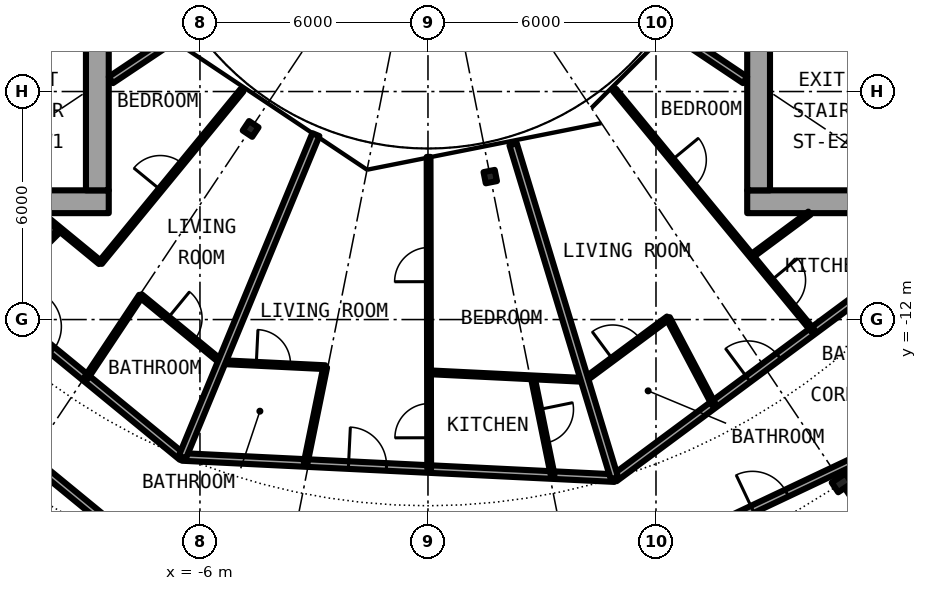
"""IFC4 building model, lengths in metres.
Left out: names, types, materials, properties, quantities, classifications, styles, units other than length and angle.
Written with IfcOpenShell. Run it as: python <this file> out.ifc"""

import sys

from ifc_helpers import new_model, si_unit, direction, frame, frame_2d, origin, origin_2d, place, context, subcontext, project, spatial, rectangle, i_section, extrude, element, fill, save


model = new_model("IFC4")
c1 = context("Model", 3, precision=1e-05, world=origin(), true_north=direction((0.0, 1.0)))
c2 = subcontext(c1, "Body", "Model", "MODEL_VIEW")
j1 = project(units=[si_unit("LENGTHUNIT", "METRE"), si_unit("PLANEANGLEUNIT", "RADIAN")], contexts=[c1])
p1 = place(None, origin())
s1 = spatial("IfcSite", under=j1, at=p1, CompositionType="ELEMENT")
p2 = place(p1, origin())
s2 = spatial("IfcBuilding", under=s1, at=p2, CompositionType="ELEMENT")
p3 = place(p2, frame((0.0, 0.0, 111.65)))
s3 = spatial("IfcBuildingStorey", under=s2, at=p3, CompositionType="ELEMENT", Elevation=111.65)
p4 = place(p3, frame((10.889, -16.297, 0.0), z_axis=(0.0, 0.0, 1.0), x_axis=(0.55557023302, -0.831469612303, 0.0)))
e1 = element("IfcColumn", 1, at=p4, inside=s3, PredefinedType="COLUMN", context=c2, shape_type="SweptSolid", body=[
    extrude(i_section(OverallWidth=0.307, OverallDepth=0.432, WebThickness=0.021, FlangeThickness=0.04, FilletRadius=0.027, at=origin_2d()), origin(), (0.0, 0.0, 1.0), 3.05),
])
for number, where, z_axis, x_axis in (
    (2, (-4.667, -6.984, 0.0), (0.0, 0.0, 1.0), (-0.556, -0.831, 0.0)),
    (3, (1.639, -8.239, 0.0), (0.0, 0.0, 1.0), (0.195, -0.981, 0.0)),
):
    element("IfcColumn", number, at=place(p3, frame(where, z_axis=z_axis, x_axis=x_axis)), inside=s3, PredefinedType="COLUMN", context=c2, shape_type="SweptSolid", body=[
        extrude(i_section(OverallWidth=0.3, OverallDepth=0.3, WebThickness=0.011, FlangeThickness=0.019, FilletRadius=0.027, at=origin_2d()), origin(), (0.0, 0.0, 1.0), 3.05),
    ])
p5 = place(p3, frame((8.4, -8.9, 0.0), z_axis=(0.0, 0.0, 1.0), x_axis=(1.0, 0.0, 0.0)))
e4 = element("IfcWall", 4, at=p5, inside=s3, PredefinedType="SHEAR", context=c2, shape_type="SweptSolid", body=[
    extrude(rectangle(XDim=13.8, YDim=0.6, at=frame_2d((6.9, 0.0))), origin(), (0.0, 0.0, 1.0), 3.05),
])
p6 = place(p5, frame((11.475, 0.0, 0.0)))
e5 = element("IfcOpeningElement", 5, at=p6, cuts=e4, PredefinedType="OPENING", context=c2, shape_type="SweptSolid", body=[
    extrude(rectangle(XDim=1.2, YDim=2.3, at=frame_2d((0.6, 1.15))), frame((0.0, 0.31, 0.0), z_axis=(0.0, -1.0, 0.0), x_axis=(1.0, 0.0, 0.0)), (0.0, 0.0, 1.0), 0.62),
])
p7 = place(p3, frame((8.7, -8.6, 0.0), z_axis=(0.0, 0.0, 1.0), x_axis=(0.0, 1.0, 0.0)))
e6 = element("IfcWall", 6, at=p7, inside=s3, PredefinedType="SHEAR", context=c2, shape_type="SweptSolid", body=[
    extrude(rectangle(XDim=17.2, YDim=0.6, at=frame_2d((8.6, 0.0))), origin(), (0.0, 0.0, 1.0), 3.05),
])
p8 = place(p7, frame((7.4, 0.0, 0.1)))
e7 = element("IfcOpeningElement", 7, at=p8, cuts=e6, PredefinedType="OPENING", context=c2, shape_type="SweptSolid", body=[
    extrude(rectangle(XDim=2.4, YDim=2.2, at=frame_2d((1.2, 1.1))), frame((0.0, 0.31, 0.0), z_axis=(0.0, -1.0, 0.0), x_axis=(1.0, 0.0, 0.0)), (0.0, 0.0, 1.0), 0.62),
])
p9 = place(p3, frame((-22.2, -8.9, 0.0), z_axis=(0.0, 0.0, 1.0), x_axis=(1.0, 0.0, 0.0)))
e8 = element("IfcWall", 8, at=p9, inside=s3, PredefinedType="SHEAR", context=c2, shape_type="SweptSolid", body=[
    extrude(rectangle(XDim=13.8, YDim=0.6, at=frame_2d((6.9, 0.0))), origin(), (0.0, 0.0, 1.0), 3.05),
])
p10 = place(p9, frame((1.125, 0.0, 0.0)))
e9 = element("IfcOpeningElement", 9, at=p10, cuts=e8, PredefinedType="OPENING", context=c2, shape_type="SweptSolid", body=[
    extrude(rectangle(XDim=1.2, YDim=2.3, at=frame_2d((0.6, 1.15))), frame((0.0, 0.31, 0.0), z_axis=(0.0, -1.0, 0.0), x_axis=(1.0, 0.0, 0.0)), (0.0, 0.0, 1.0), 0.62),
])
p11 = place(p3, frame((-8.7, 8.6, 0.0), z_axis=(0.0, 0.0, 1.0), x_axis=(0.0, -1.0, 0.0)))
e10 = element("IfcWall", 10, at=p11, inside=s3, PredefinedType="SHEAR", context=c2, shape_type="SweptSolid", body=[
    extrude(rectangle(XDim=17.2, YDim=0.6, at=frame_2d((8.6, 0.0))), origin(), (0.0, 0.0, 1.0), 3.05),
])
p12 = place(p11, frame((7.4, 0.0, 0.1)))
e11 = element("IfcOpeningElement", 11, at=p12, cuts=e10, PredefinedType="OPENING", context=c2, shape_type="SweptSolid", body=[
    extrude(rectangle(XDim=2.4, YDim=2.2, at=frame_2d((1.2, 1.1))), frame((0.0, 0.31, 0.0), z_axis=(0.0, -1.0, 0.0), x_axis=(1.0, 0.0, 0.0)), (0.0, 0.0, 1.0), 0.62),
])
p13 = place(p3, frame((-13.538, -16.496, 0.0), z_axis=(0.0, 0.0, 1.0), x_axis=(0.773000340237, -0.634405606843, 0.0)))
e12 = element("IfcWall", 12, at=p13, inside=s3, PredefinedType="PARTITIONING", context=c2, shape_type="SweptSolid", body=[
    extrude(rectangle(XDim=6.474, YDim=0.1, at=frame_2d((3.237, 0.0))), origin(), (0.0, 0.0, 1.0), 2.7),
])
p14 = place(p3, frame((3.967, -19.155, 0.0), z_axis=(0.0, 0.0, 1.0), x_axis=(0.904003983145, 0.427524032609, 0.0)))
e13 = element("IfcWall", 13, at=p14, inside=s3, PredefinedType="PARTITIONING", context=c2, shape_type="SweptSolid", body=[
    extrude(rectangle(XDim=9.37, YDim=0.2, at=frame_2d((4.685, 0.0))), origin(), (0.0, 0.0, 1.0), 2.39),
])
p15 = place(p14, frame((5.056, 0.0, 0.0)))
e14 = element("IfcOpeningElement", 14, at=p15, cuts=e13, PredefinedType="OPENING", context=c2, shape_type="SweptSolid", body=[
    extrude(rectangle(XDim=1.0, YDim=2.3, at=frame_2d((0.5, 1.15))), frame((0.0, 0.11, 0.0), z_axis=(0.0, -1.0, 0.0), x_axis=(1.0, 0.0, 0.0)), (0.0, 0.0, 1.0), 0.22),
])
p16 = place(p3, frame((-16.173, -10.991, 0.0), z_axis=(0.0, 0.0, 1.0), x_axis=(0.773013989296, -0.634388975591, 0.0)))
e15 = element("IfcWall", 15, at=p16, inside=s3, PredefinedType="PARTITIONING", context=c2, shape_type="SweptSolid", body=[
    extrude(rectangle(XDim=11.219, YDim=0.2, at=frame_2d((5.609, 0.0))), origin(), (0.0, 0.0, 1.0), 2.39),
])
p17 = place(p16, frame((3.135, 0.0, 0.0)))
e16 = element("IfcOpeningElement", 16, at=p17, cuts=e15, PredefinedType="OPENING", context=c2, shape_type="SweptSolid", body=[
    extrude(rectangle(XDim=1.0, YDim=2.3, at=frame_2d((0.5, 1.15))), frame((0.0, 0.11, 0.0), z_axis=(0.0, -1.0, 0.0), x_axis=(1.0, 0.0, 0.0)), (0.0, 0.0, 1.0), 0.22),
])
p18 = place(p3, frame((-14.05, -9.392, 0.0), z_axis=(0.0, 0.0, 1.0), x_axis=(0.773074935257, -0.634314704605, 0.0)))
e17 = element("IfcWall", 17, at=p18, inside=s3, PredefinedType="PARTITIONING", context=c2, shape_type="SweptSolid", body=[
    extrude(rectangle(XDim=9.809, YDim=0.2, at=frame_2d((4.904, 0.0))), origin(), (0.0, 0.0, 1.0), 2.7),
])
p19 = place(p18, frame((4.402, 0.0, 0.0)))
e18 = element("IfcOpeningElement", 18, at=p19, cuts=e17, PredefinedType="OPENING", context=c2, shape_type="SweptSolid", body=[
    extrude(rectangle(XDim=1.0, YDim=2.3, at=frame_2d((0.5, 1.15))), frame((0.0, 0.11, 0.0), z_axis=(0.0, -1.0, 0.0), x_axis=(1.0, 0.0, 0.0)), (0.0, 0.0, 1.0), 0.22),
])
p20 = place(p3, frame((-6.467, -15.615, 0.0), z_axis=(0.0, 0.0, 1.0), x_axis=(0.998803328932, -0.048907158111, 0.0)))
e19 = element("IfcWall", 19, at=p20, inside=s3, PredefinedType="PARTITIONING", context=c2, shape_type="SweptSolid", body=[
    extrude(rectangle(XDim=11.392, YDim=0.2, at=frame_2d((5.696, 0.0))), origin(), (0.0, 0.0, 1.0), 2.7),
])
p21 = place(p20, frame((4.381, 0.0, 0.0)))
e20 = element("IfcOpeningElement", 20, at=p21, cuts=e19, PredefinedType="OPENING", context=c2, shape_type="SweptSolid", body=[
    extrude(rectangle(XDim=1.0, YDim=2.3, at=frame_2d((0.5, 1.15))), frame((0.0, 0.11, 0.0), z_axis=(0.0, -1.0, 0.0), x_axis=(1.0, 0.0, 0.0)), (0.0, 0.0, 1.0), 0.22),
])
p22 = place(p3, frame((4.906, -16.172, 0.0), z_axis=(0.0, 0.0, 1.0), x_axis=(0.803191461888, 0.595720971219, 0.0)))
e21 = element("IfcWall", 21, at=p22, inside=s3, PredefinedType="PARTITIONING", context=c2, shape_type="SweptSolid", body=[
    extrude(rectangle(XDim=9.76, YDim=0.2, at=frame_2d((4.88, 0.0))), origin(), (0.0, 0.0, 1.0), 2.7),
])
p23 = place(p22, frame((4.38, 0.0, 0.0)))
e22 = element("IfcOpeningElement", 22, at=p23, cuts=e21, PredefinedType="OPENING", context=c2, shape_type="SweptSolid", body=[
    extrude(rectangle(XDim=1.0, YDim=2.3, at=frame_2d((0.5, 1.15))), frame((0.0, 0.11, 0.0), z_axis=(0.0, -1.0, 0.0), x_axis=(1.0, 0.0, 0.0)), (0.0, 0.0, 1.0), 0.22),
])
p24 = place(p3, frame((-10.213, -9.197, 0.0), z_axis=(0.0, 0.0, 1.0), x_axis=(0.772817828959, -0.634627925042, 0.0)))
e23 = element("IfcWall", 23, at=p24, inside=s3, PredefinedType="PARTITIONING", context=c2, shape_type="SweptSolid", body=[
    extrude(rectangle(XDim=2.055, YDim=0.1, at=frame_2d((1.027, 0.0))), origin(), (0.0, 0.0, 1.0), 2.7),
])
p25 = place(p3, frame((-7.563, -11.373, 0.0), z_axis=(0.0, 0.0, 1.0), x_axis=(0.772732480827, -0.634731843439, 0.0)))
e24 = element("IfcWall", 24, at=p25, inside=s3, PredefinedType="PARTITIONING", context=c2, shape_type="SweptSolid", body=[
    extrude(rectangle(XDim=2.748, YDim=0.1, at=frame_2d((1.374, 0.0))), origin(), (0.0, 0.0, 1.0), 2.7),
])
p26 = place(p25, frame((0.93, 0.0, 0.0)))
e25 = element("IfcOpeningElement", 25, at=p26, cuts=e24, PredefinedType="OPENING", context=c2, shape_type="SweptSolid", body=[
    extrude(rectangle(XDim=0.9, YDim=2.3, at=frame_2d((0.45, 1.15))), frame((0.0, 0.06, 0.0), z_axis=(0.0, -1.0, 0.0), x_axis=(1.0, 0.0, 0.0)), (0.0, 0.0, 1.0), 0.12),
])
p27 = place(p3, frame((-5.434, -13.119, 0.0), z_axis=(0.0, 0.0, 1.0), x_axis=(0.998796928508, -0.049037695739, 0.0)))
e26 = element("IfcWall", 26, at=p27, inside=s3, PredefinedType="PARTITIONING", context=c2, shape_type="SweptSolid", body=[
    extrude(rectangle(XDim=2.733, YDim=0.1, at=frame_2d((1.367, 0.0))), origin(), (0.0, 0.0, 1.0), 2.7),
])
p28 = place(p27, frame((0.917, 0.0, 0.0)))
e27 = element("IfcOpeningElement", 27, at=p28, cuts=e26, PredefinedType="OPENING", context=c2, shape_type="SweptSolid", body=[
    extrude(rectangle(XDim=0.9, YDim=2.3, at=frame_2d((0.45, 1.15))), frame((0.0, 0.06, 0.0), z_axis=(0.0, -1.0, 0.0), x_axis=(1.0, 0.0, 0.0)), (0.0, 0.0, 1.0), 0.12),
])
p29 = place(p3, frame((0.027, -13.387, 0.0), z_axis=(0.0, 0.0, 1.0), x_axis=(0.998789681748, -0.049185075323, 0.0)))
e28 = element("IfcWall", 28, at=p29, inside=s3, PredefinedType="PARTITIONING", context=c2, shape_type="SweptSolid", body=[
    extrude(rectangle(XDim=4.11, YDim=0.1, at=frame_2d((2.055, 0.0))), origin(), (0.0, 0.0, 1.0), 2.7),
])
p30 = place(p3, frame((4.122, -13.589, 0.0), z_axis=(0.0, 0.0, 1.0), x_axis=(0.803128348509, 0.595806055542, 0.0)))
e29 = element("IfcWall", 29, at=p30, inside=s3, PredefinedType="PARTITIONING", context=c2, shape_type="SweptSolid", body=[
    extrude(rectangle(XDim=2.734, YDim=0.1, at=frame_2d((1.367, 0.0))), origin(), (0.0, 0.0, 1.0), 2.7),
])
p31 = place(p30, frame((0.917, 0.0, 0.0)))
e30 = element("IfcOpeningElement", 30, at=p31, cuts=e29, PredefinedType="OPENING", context=c2, shape_type="SweptSolid", body=[
    extrude(rectangle(XDim=0.9, YDim=2.3, at=frame_2d((0.45, 1.15))), frame((0.0, 0.06, 0.0), z_axis=(0.0, -1.0, 0.0), x_axis=(1.0, 0.0, 0.0)), (0.0, 0.0, 1.0), 0.12),
])
p32 = place(p3, frame((8.513, -10.332, 0.0), z_axis=(0.0, 0.0, 1.0), x_axis=(0.803149591038, 0.595777420196, 0.0)))
e31 = element("IfcWall", 31, at=p32, inside=s3, PredefinedType="PARTITIONING", context=c2, shape_type="SweptSolid", body=[
    extrude(rectangle(XDim=1.9, YDim=0.1, at=frame_2d((0.95, 0.0))), origin(), (0.0, 0.0, 1.0), 2.7),
])
for number, where, z_axis, x_axis in (
    (32, (-6.513, -4.472, 0.0), (0.0, 0.0, 1.0), (-0.831, -0.556, 0.0)),
    (33, (6.513, -4.472, 0.0), (0.0, 0.0, 1.0), (0.831, -0.556, 0.0)),
):
    element("IfcWall", number, at=place(p3, frame(where, z_axis=z_axis, x_axis=x_axis)), inside=s3, PredefinedType="PARTITIONING", context=c2, shape_type="SweptSolid", body=[
        extrude(rectangle(XDim=2.203, YDim=0.2, at=frame_2d((1.101, 0.0))), origin(), (0.0, 0.0, 1.0), 2.7),
    ])
p33 = place(p3, frame((-11.524, -11.464, 0.0), z_axis=(0.0, 0.0, 1.0), x_axis=(0.708796844581, 0.705412668665, 0.0)))
e34 = element("IfcWall", 34, at=p33, inside=s3, PredefinedType="PARTITIONING", context=c2, shape_type="SweptSolid", body=[
    extrude(rectangle(XDim=2.597, YDim=0.1, at=frame_2d((1.299, 0.0))), origin(), (0.0, 0.0, 1.0), 2.7),
])
p34 = place(p33, frame((0.849, 0.0, 0.0)))
e35 = element("IfcOpeningElement", 35, at=p34, cuts=e34, PredefinedType="OPENING", context=c2, shape_type="SweptSolid", body=[
    extrude(rectangle(XDim=0.9, YDim=2.3, at=frame_2d((0.45, 1.15))), frame((0.0, 0.06, 0.0), z_axis=(0.0, -1.0, 0.0), x_axis=(1.0, 0.0, 0.0)), (0.0, 0.0, 1.0), 0.12),
])
p35 = place(p3, frame((-8.996, -13.539, 0.0), z_axis=(0.0, 0.0, 1.0), x_axis=(0.553615197403, 0.83277260594, 0.0)))
e36 = element("IfcWall", 36, at=p35, inside=s3, PredefinedType="PARTITIONING", context=c2, shape_type="SweptSolid", body=[
    extrude(rectangle(XDim=2.597, YDim=0.1, at=frame_2d((1.299, 0.0))), origin(), (0.0, 0.0, 1.0), 2.7),
])
p36 = place(p3, frame((-8.62, -10.504, 0.0), z_axis=(0.0, 0.0, 1.0), x_axis=(0.634539754242, 0.772890225249, 0.0)))
e37 = element("IfcWall", 37, at=p36, inside=s3, PredefinedType="PARTITIONING", context=c2, shape_type="SweptSolid", body=[
    extrude(rectangle(XDim=5.867, YDim=0.1, at=frame_2d((2.934, 0.0))), origin(), (0.0, 0.0, 1.0), 2.7),
])
p37 = place(p36, frame((2.484, 0.0, 0.0)))
e38 = element("IfcOpeningElement", 38, at=p37, cuts=e37, PredefinedType="OPENING", context=c2, shape_type="SweptSolid", body=[
    extrude(rectangle(XDim=0.9, YDim=2.3, at=frame_2d((0.45, 1.15))), frame((0.0, 0.06, 0.0), z_axis=(0.0, -1.0, 0.0), x_axis=(1.0, 0.0, 0.0)), (0.0, 0.0, 1.0), 0.12),
])
p38 = place(p3, frame((-6.462, -15.616, 0.0), z_axis=(0.0, 0.0, 1.0), x_axis=(0.382556139466, 0.923932248683, 0.0)))
e39 = element("IfcWall", 39, at=p38, inside=s3, PredefinedType="PARTITIONING", context=c2, shape_type="SweptSolid", body=[
    extrude(rectangle(XDim=9.18, YDim=0.2, at=frame_2d((4.59, 0.0))), origin(), (0.0, 0.0, 1.0), 2.7),
])
p39 = place(p3, frame((-3.218, -15.773, 0.0), z_axis=(0.0, 0.0, 1.0), x_axis=(0.199820523641, 0.979832515449, 0.0)))
e40 = element("IfcWall", 40, at=p39, inside=s3, PredefinedType="PARTITIONING", context=c2, shape_type="SweptSolid", body=[
    extrude(rectangle(XDim=2.572, YDim=0.1, at=frame_2d((1.286, 0.0))), origin(), (0.0, 0.0, 1.0), 2.7),
])
p40 = place(p3, frame((0.032, -15.933, 0.0), z_axis=(0.0, 0.0, 1.0), x_axis=(-0.0019321625, 0.999998133372, 0.0)))
e41 = element("IfcWall", 41, at=p40, inside=s3, PredefinedType="PARTITIONING", context=c2, shape_type="SweptSolid", body=[
    extrude(rectangle(XDim=8.213, YDim=0.1, at=frame_2d((4.106, 0.0))), origin(), (0.0, 0.0, 1.0), 2.7),
])
p41 = place(p40, frame((0.823, 0.0, 0.0)))
e42 = element("IfcOpeningElement", 42, at=p41, cuts=e41, PredefinedType="OPENING", context=c2, shape_type="SweptSolid", body=[
    extrude(rectangle(XDim=0.9, YDim=2.3, at=frame_2d((0.45, 1.15))), frame((0.0, 0.06, 0.0), z_axis=(0.0, -1.0, 0.0), x_axis=(1.0, 0.0, 0.0)), (0.0, 0.0, 1.0), 0.12),
])
p42 = place(p40, frame((4.93, 0.0, 0.0)))
e43 = element("IfcOpeningElement", 43, at=p42, cuts=e41, PredefinedType="OPENING", context=c2, shape_type="SweptSolid", body=[
    extrude(rectangle(XDim=0.9, YDim=2.3, at=frame_2d((0.45, 1.15))), frame((0.0, 0.06, 0.0), z_axis=(0.0, -1.0, 0.0), x_axis=(1.0, 0.0, 0.0)), (0.0, 0.0, 1.0), 0.12),
])
p43 = place(p3, frame((2.24, -7.388, 0.0), z_axis=(0.0, 0.0, 1.0), x_axis=(0.290420725025, -0.956899055531, 0.0)))
e44 = element("IfcWall", 44, at=p43, inside=s3, PredefinedType="PARTITIONING", context=c2, shape_type="SweptSolid", body=[
    extrude(rectangle(XDim=9.18, YDim=0.2, at=frame_2d((4.59, 0.0))), origin(), (0.0, 0.0, 1.0), 2.7),
])
p44 = place(p3, frame((2.757, -13.521, 0.0), z_axis=(0.0, 0.0, 1.0), x_axis=(0.199675621436, -0.979862054681, 0.0)))
e45 = element("IfcWall", 45, at=p44, inside=s3, PredefinedType="PARTITIONING", context=c2, shape_type="SweptSolid", body=[
    extrude(rectangle(XDim=2.624, YDim=0.1, at=frame_2d((1.312, 0.0))), origin(), (0.0, 0.0, 1.0), 2.7),
])
p45 = place(p44, frame((0.862, 0.0, 0.0)))
e46 = element("IfcOpeningElement", 46, at=p45, cuts=e45, PredefinedType="OPENING", context=c2, shape_type="SweptSolid", body=[
    extrude(rectangle(XDim=0.9, YDim=2.3, at=frame_2d((0.45, 1.15))), frame((0.0, 0.06, 0.0), z_axis=(0.0, -1.0, 0.0), x_axis=(1.0, 0.0, 0.0)), (0.0, 0.0, 1.0), 0.12),
])
p46 = place(p3, frame((4.908, -5.959, 0.0), z_axis=(0.0, 0.0, 1.0), x_axis=(0.636105207978, -0.771602335652, 0.0)))
e47 = element("IfcWall", 47, at=p46, inside=s3, PredefinedType="PARTITIONING", context=c2, shape_type="SweptSolid", body=[
    extrude(rectangle(XDim=8.213, YDim=0.1, at=frame_2d((4.106, 0.0))), origin(), (0.0, 0.0, 1.0), 2.7),
])
p47 = place(p46, frame((6.49, 0.0, 0.0)))
e48 = element("IfcOpeningElement", 48, at=p47, cuts=e47, PredefinedType="OPENING", context=c2, shape_type="SweptSolid", body=[
    extrude(rectangle(XDim=0.9, YDim=2.3, at=frame_2d((0.45, 1.15))), frame((0.0, 0.06, 0.0), z_axis=(0.0, -1.0, 0.0), x_axis=(1.0, 0.0, 0.0)), (0.0, 0.0, 1.0), 0.12),
])
p48 = place(p46, frame((2.384, 0.0, 0.0)))
e49 = element("IfcOpeningElement", 49, at=p48, cuts=e47, PredefinedType="OPENING", context=c2, shape_type="SweptSolid", body=[
    extrude(rectangle(XDim=0.9, YDim=2.3, at=frame_2d((0.45, 1.15))), frame((0.0, 0.06, 0.0), z_axis=(0.0, -1.0, 0.0), x_axis=(1.0, 0.0, 0.0)), (0.0, 0.0, 1.0), 0.12),
])
p49 = place(p3, frame((6.318, -11.96, 0.0), z_axis=(0.0, 0.0, 1.0), x_axis=(0.467001992543, -0.884256263173, 0.0)))
e50 = element("IfcWall", 50, at=p49, inside=s3, PredefinedType="PARTITIONING", context=c2, shape_type="SweptSolid", body=[
    extrude(rectangle(XDim=2.572, YDim=0.1, at=frame_2d((1.286, 0.0))), origin(), (0.0, 0.0, 1.0), 2.7),
])
p50 = place(p3, frame((11.041, -16.455, 0.0), z_axis=(0.0, 0.0, 1.0), x_axis=(0.557051175603, -0.830478168141, 0.0)))
e51 = element("IfcWall", 51, at=p50, inside=s3, PredefinedType="PARTITIONING", context=c2, shape_type="SweptSolid", body=[
    extrude(rectangle(XDim=2.059, YDim=0.1, at=frame_2d((1.03, 0.0))), origin(), (0.0, 0.0, 1.0), 2.7),
])
p51 = place(p50, frame((0.46, 0.0, 0.0)))
e52 = element("IfcOpeningElement", 52, at=p51, cuts=e51, PredefinedType="OPENING", context=c2, shape_type="SweptSolid", body=[
    extrude(rectangle(XDim=0.9, YDim=2.3, at=frame_2d((0.45, 1.15))), frame((0.0, 0.06, 0.0), z_axis=(0.0, -1.0, 0.0), x_axis=(1.0, 0.0, 0.0)), (0.0, 0.0, 1.0), 0.12),
])
p52 = place(p15, origin())
e53 = element("IfcDoor", 53, at=p52, inside=s3, OperationType="SINGLE_SWING_RIGHT", PredefinedType="DOOR", context=c2, shape_type="SweptSolid", body=[
    extrude(rectangle(XDim=1.0, YDim=2.3, at=frame_2d((0.5, 1.15))), frame((0.0, 0.025, 0.0), z_axis=(0.0, -1.0, 0.0), x_axis=(1.0, 0.0, 0.0)), (0.0, 0.0, 1.0), 0.05),
])
fill(e14, e53)
p53 = place(p19, origin())
e54 = element("IfcDoor", 54, at=p53, inside=s3, OperationType="SINGLE_SWING_LEFT", PredefinedType="DOOR", context=c2, shape_type="SweptSolid", body=[
    extrude(rectangle(XDim=1.0, YDim=2.3, at=frame_2d((0.5, 1.15))), frame((0.0, 0.025, 0.0), z_axis=(0.0, -1.0, 0.0), x_axis=(1.0, 0.0, 0.0)), (0.0, 0.0, 1.0), 0.05),
])
fill(e18, e54)
p54 = place(p26, origin())
e55 = element("IfcDoor", 55, at=p54, inside=s3, OperationType="SINGLE_SWING_RIGHT", PredefinedType="DOOR", context=c2, shape_type="SweptSolid", body=[
    extrude(rectangle(XDim=0.9, YDim=2.3, at=frame_2d((0.45, 1.15))), frame((0.0, 0.025, 0.0), z_axis=(0.0, -1.0, 0.0), x_axis=(1.0, 0.0, 0.0)), (0.0, 0.0, 1.0), 0.05),
])
fill(e25, e55)
p55 = place(p37, origin())
e56 = element("IfcDoor", 56, at=p55, inside=s3, OperationType="SINGLE_SWING_RIGHT", PredefinedType="DOOR", context=c2, shape_type="SweptSolid", body=[
    extrude(rectangle(XDim=0.9, YDim=2.3, at=frame_2d((0.45, 1.15))), frame((0.0, 0.025, 0.0), z_axis=(0.0, -1.0, 0.0), x_axis=(1.0, 0.0, 0.0)), (0.0, 0.0, 1.0), 0.05),
])
fill(e38, e56)
p56 = place(p21, origin())
e57 = element("IfcDoor", 57, at=p56, inside=s3, OperationType="SINGLE_SWING_LEFT", PredefinedType="DOOR", context=c2, shape_type="SweptSolid", body=[
    extrude(rectangle(XDim=1.0, YDim=2.3, at=frame_2d((0.5, 1.15))), frame((0.0, 0.025, 0.0), z_axis=(0.0, -1.0, 0.0), x_axis=(1.0, 0.0, 0.0)), (0.0, 0.0, 1.0), 0.05),
])
fill(e20, e57)
p57 = place(p28, origin())
e58 = element("IfcDoor", 58, at=p57, inside=s3, OperationType="SINGLE_SWING_LEFT", PredefinedType="DOOR", context=c2, shape_type="SweptSolid", body=[
    extrude(rectangle(XDim=0.9, YDim=2.3, at=frame_2d((0.45, 1.15))), frame((0.0, 0.025, 0.0), z_axis=(0.0, -1.0, 0.0), x_axis=(1.0, 0.0, 0.0)), (0.0, 0.0, 1.0), 0.05),
])
fill(e27, e58)
p58 = place(p41, origin())
e59 = element("IfcDoor", 59, at=p58, inside=s3, OperationType="SINGLE_SWING_LEFT", PredefinedType="DOOR", context=c2, shape_type="SweptSolid", body=[
    extrude(rectangle(XDim=0.9, YDim=2.3, at=frame_2d((0.45, 1.15))), frame((0.0, 0.025, 0.0), z_axis=(0.0, -1.0, 0.0), x_axis=(1.0, 0.0, 0.0)), (0.0, 0.0, 1.0), 0.05),
])
fill(e42, e59)
p59 = place(p45, origin())
e60 = element("IfcDoor", 60, at=p59, inside=s3, OperationType="SINGLE_SWING_RIGHT", PredefinedType="DOOR", context=c2, shape_type="SweptSolid", body=[
    extrude(rectangle(XDim=0.9, YDim=2.3, at=frame_2d((0.45, 1.15))), frame((0.0, 0.025, 0.0), z_axis=(0.0, -1.0, 0.0), x_axis=(1.0, 0.0, 0.0)), (0.0, 0.0, 1.0), 0.05),
])
fill(e46, e60)
p60 = place(p42, origin())
e61 = element("IfcDoor", 61, at=p60, inside=s3, OperationType="SINGLE_SWING_RIGHT", PredefinedType="DOOR", context=c2, shape_type="SweptSolid", body=[
    extrude(rectangle(XDim=0.9, YDim=2.3, at=frame_2d((0.45, 1.15))), frame((0.0, 0.025, 0.0), z_axis=(0.0, -1.0, 0.0), x_axis=(1.0, 0.0, 0.0)), (0.0, 0.0, 1.0), 0.05),
])
fill(e43, e61)
p61 = place(p23, origin())
e62 = element("IfcDoor", 62, at=p61, inside=s3, OperationType="SINGLE_SWING_LEFT", PredefinedType="DOOR", context=c2, shape_type="SweptSolid", body=[
    extrude(rectangle(XDim=1.0, YDim=2.3, at=frame_2d((0.5, 1.15))), frame((0.0, 0.025, 0.0), z_axis=(0.0, -1.0, 0.0), x_axis=(1.0, 0.0, 0.0)), (0.0, 0.0, 1.0), 0.05),
])
fill(e22, e62)
p62 = place(p31, origin())
e63 = element("IfcDoor", 63, at=p62, inside=s3, OperationType="SINGLE_SWING_RIGHT", PredefinedType="DOOR", context=c2, shape_type="SweptSolid", body=[
    extrude(rectangle(XDim=0.9, YDim=2.3, at=frame_2d((0.45, 1.15))), frame((0.0, 0.025, 0.0), z_axis=(0.0, -1.0, 0.0), x_axis=(1.0, 0.0, 0.0)), (0.0, 0.0, 1.0), 0.05),
])
fill(e30, e63)
p63 = place(p47, origin())
e64 = element("IfcDoor", 64, at=p63, inside=s3, OperationType="SINGLE_SWING_RIGHT", PredefinedType="DOOR", context=c2, shape_type="SweptSolid", body=[
    extrude(rectangle(XDim=0.9, YDim=2.3, at=frame_2d((0.45, 1.15))), frame((0.0, 0.025, 0.0), z_axis=(0.0, -1.0, 0.0), x_axis=(1.0, 0.0, 0.0)), (0.0, 0.0, 1.0), 0.05),
])
fill(e48, e64)
p64 = place(p48, origin())
e65 = element("IfcDoor", 65, at=p64, inside=s3, OperationType="SINGLE_SWING_LEFT", PredefinedType="DOOR", context=c2, shape_type="SweptSolid", body=[
    extrude(rectangle(XDim=0.9, YDim=2.3, at=frame_2d((0.45, 1.15))), frame((0.0, 0.025, 0.0), z_axis=(0.0, -1.0, 0.0), x_axis=(1.0, 0.0, 0.0)), (0.0, 0.0, 1.0), 0.05),
])
fill(e49, e65)
save(model, sys.argv[1])
